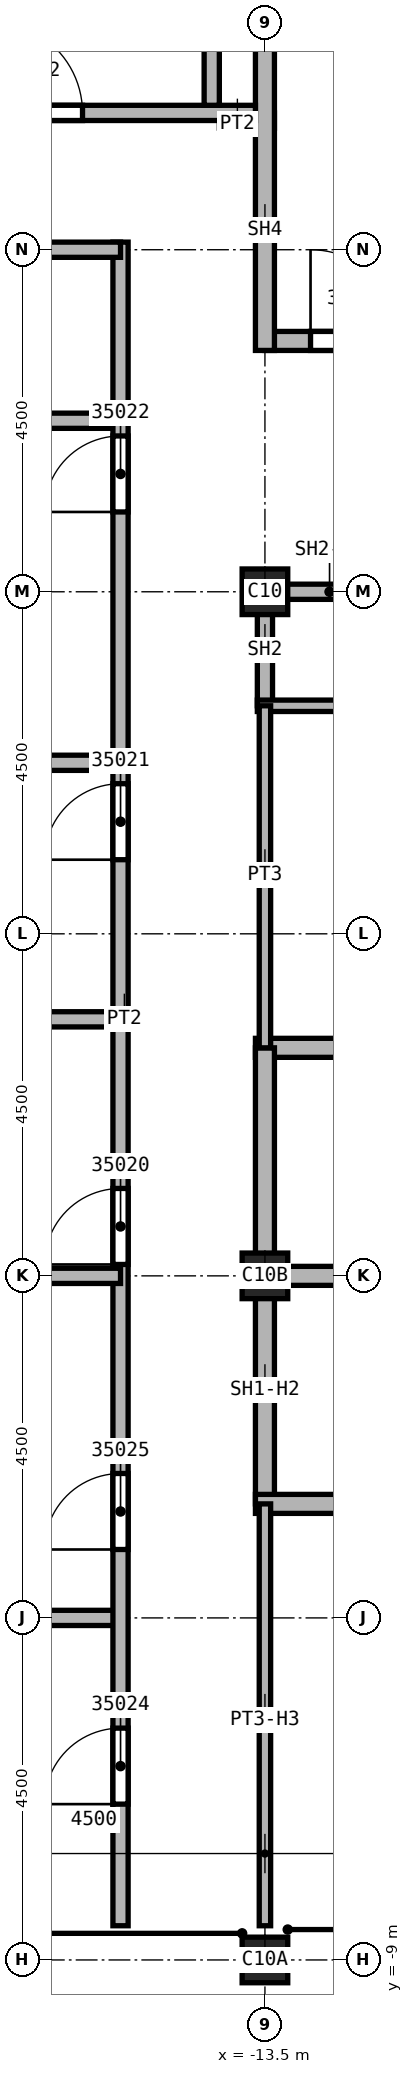
"""IFC4 building model, lengths in metres.
Left out: names, types, materials, properties, quantities, classifications, styles, units other than length and angle.
Written with IfcOpenShell. Run it as: python <this file> out.ifc"""

import sys

from ifc_helpers import new_model, si_unit, direction, frame, frame_2d, origin, origin_2d, place, context, subcontext, project, spatial, rectangle, extrude, element, fill, save


model = new_model("IFC4")
c1 = context("Model", 3, precision=1e-05, world=origin(), true_north=direction((0.0, 1.0)))
c2 = subcontext(c1, "Body", "Model", "MODEL_VIEW")
j1 = project(units=[si_unit("LENGTHUNIT", "METRE"), si_unit("PLANEANGLEUNIT", "RADIAN")], contexts=[c1])
p1 = place(None, origin())
s1 = spatial("IfcSite", under=j1, at=p1, CompositionType="ELEMENT")
p2 = place(p1, origin())
s2 = spatial("IfcBuilding", under=s1, at=p2, CompositionType="ELEMENT")
p3 = place(p2, frame((0.0, 0.0, 376.0)))
s3 = spatial("IfcBuildingStorey", under=s2, at=p3, CompositionType="ELEMENT", Elevation=376.0)
p4 = place(p3, frame((-13.5, 0.0, 0.0), z_axis=(0.0, 0.0, 1.0), x_axis=(1.0, 0.0, 0.0)))
e1 = element("IfcColumn", 1, at=p4, inside=s3, PredefinedType="COLUMN", context=c2, shape_type="SweptSolid", body=[
    extrude(rectangle(XDim=0.6, YDim=0.6, at=origin_2d()), origin(), (0.0, 0.0, 1.0), 7.919),
])
p5 = place(p3, frame((-13.5, 9.0, 0.0), z_axis=(0.0, 0.0, 1.0), x_axis=(1.0, 0.0, 0.0)))
e2 = element("IfcColumn", 2, at=p5, inside=s3, PredefinedType="COLUMN", context=c2, shape_type="SweptSolid", body=[
    extrude(rectangle(XDim=0.6, YDim=0.6, at=origin_2d()), origin(), (0.0, 0.0, 1.0), 4.6),
])
p6 = place(p3, frame((-13.5, -9.0, 0.0), z_axis=(0.0, 0.0, 1.0), x_axis=(1.0, 0.0, 0.0)))
e3 = element("IfcColumn", 3, at=p6, inside=s3, PredefinedType="COLUMN", context=c2, shape_type="SweptSolid", body=[
    extrude(rectangle(XDim=0.6, YDim=0.6, at=origin_2d()), origin(), (0.0, 0.0, 1.0), 3.725),
])
for number, where, z_axis, x_axis in (
    (4, (-26.736, 3.375, 0.0), (0.0, 0.0, 1.0), (1.0, 0.0, 0.0)),
    (5, (-26.736, 11.25, 0.0), (0.0, 0.0, 1.0), (1.0, 0.0, 0.0)),
):
    element("IfcWall", number, at=place(p3, frame(where, z_axis=z_axis, x_axis=x_axis)), inside=s3, PredefinedType="PARTITIONING", context=c2, shape_type="SweptSolid", body=[
        extrude(rectangle(XDim=11.336, YDim=0.2, at=frame_2d((5.668, 0.0))), origin(), (0.0, 0.0, 1.0), 4.15),
    ])
p7 = place(p3, frame((-26.55, -4.5, 0.0), z_axis=(0.0, 0.0, 1.0), x_axis=(1.0, 0.0, 0.0)))
e6 = element("IfcWall", 6, at=p7, inside=s3, PredefinedType="PARTITIONING", context=c2, shape_type="SweptSolid", body=[
    extrude(rectangle(XDim=11.15, YDim=0.2, at=frame_2d((5.575, 0.0))), origin(), (0.0, 0.0, 1.0), 4.566),
])
p8 = place(p3, frame((-20.65, 6.75, 0.0), z_axis=(0.0, 0.0, 1.0), x_axis=(1.0, 0.0, 0.0)))
e7 = element("IfcWall", 7, at=p8, inside=s3, PredefinedType="PARTITIONING", context=c2, shape_type="SweptSolid", body=[
    extrude(rectangle(XDim=5.25, YDim=0.2, at=frame_2d((2.625, 0.0))), origin(), (0.0, 0.0, 1.0), 4.15),
])
p9 = place(p3, frame((-15.4, -8.55, 0.0), z_axis=(0.0, 0.0, 1.0), x_axis=(0.0, 1.0, 0.0)))
e8 = element("IfcWall", 8, at=p9, inside=s3, PredefinedType="PARTITIONING", context=c2, shape_type="SweptSolid", body=[
    extrude(rectangle(XDim=22.15, YDim=0.2, at=frame_2d((11.075, 0.0))), origin(), (0.0, 0.0, 1.0), 4.15),
])
p10 = place(p9, frame((8.7, 0.0, 0.0)))
e9 = element("IfcOpeningElement", 9, at=p10, cuts=e8, PredefinedType="OPENING", context=c2, shape_type="SweptSolid", body=[
    extrude(rectangle(XDim=1.0, YDim=2.1, at=frame_2d((0.5, 1.05))), frame((0.0, 0.1, 0.0), z_axis=(0.0, -1.0, 0.0), x_axis=(1.0, 0.0, 0.0)), (0.0, 0.0, 1.0), 0.2),
])
p11 = place(p9, frame((14.025, 0.0, 0.0)))
e10 = element("IfcOpeningElement", 10, at=p11, cuts=e8, PredefinedType="OPENING", context=c2, shape_type="SweptSolid", body=[
    extrude(rectangle(XDim=1.0, YDim=2.1, at=frame_2d((0.5, 1.05))), frame((0.0, 0.1, 0.0), z_axis=(0.0, -1.0, 0.0), x_axis=(1.0, 0.0, 0.0)), (0.0, 0.0, 1.0), 0.2),
])
p12 = place(p9, frame((18.6, 0.0, 0.0)))
e11 = element("IfcOpeningElement", 11, at=p12, cuts=e8, PredefinedType="OPENING", context=c2, shape_type="SweptSolid", body=[
    extrude(rectangle(XDim=1.0, YDim=2.1, at=frame_2d((0.5, 1.05))), frame((0.0, 0.1, 0.0), z_axis=(0.0, -1.0, 0.0), x_axis=(1.0, 0.0, 0.0)), (0.0, 0.0, 1.0), 0.2),
])
p13 = place(p9, frame((1.6, 0.0, 0.0)))
e12 = element("IfcOpeningElement", 12, at=p13, cuts=e8, PredefinedType="OPENING", context=c2, shape_type="SweptSolid", body=[
    extrude(rectangle(XDim=1.0, YDim=2.1, at=frame_2d((0.5, 1.05))), frame((0.0, 0.1, 0.0), z_axis=(0.0, -1.0, 0.0), x_axis=(1.0, 0.0, 0.0)), (0.0, 0.0, 1.0), 0.2),
])
p14 = place(p9, frame((4.95, 0.0, 0.0)))
e13 = element("IfcOpeningElement", 13, at=p14, cuts=e8, PredefinedType="OPENING", context=c2, shape_type="SweptSolid", body=[
    extrude(rectangle(XDim=1.0, YDim=2.1, at=frame_2d((0.5, 1.05))), frame((0.0, 0.1, 0.0), z_axis=(0.0, -1.0, 0.0), x_axis=(1.0, 0.0, 0.0)), (0.0, 0.0, 1.0), 0.2),
])
p15 = place(p3, frame((-15.4, 0.0, 0.0), z_axis=(0.0, 0.0, 1.0), x_axis=(-1.0, 0.0, 0.0)))
e14 = element("IfcWall", 14, at=p15, inside=s3, PredefinedType="PARTITIONING", context=c2, shape_type="SweptSolid", body=[
    extrude(rectangle(XDim=11.15, YDim=0.2, at=frame_2d((5.575, 0.0))), origin(), (0.0, 0.0, 1.0), 6.453),
])
p16 = place(p3, frame((-15.4, 13.5, 0.0), z_axis=(0.0, 0.0, 1.0), x_axis=(-1.0, 0.0, 0.0)))
e15 = element("IfcWall", 15, at=p16, inside=s3, PredefinedType="PARTITIONING", context=c2, shape_type="SweptSolid", body=[
    extrude(rectangle(XDim=6.6, YDim=0.2, at=frame_2d((3.3, 0.0))), origin(), (0.0, 0.0, 1.0), 4.15),
])
p17 = place(p16, frame((3.7, 0.0, 0.0)))
e16 = element("IfcOpeningElement", 16, at=p17, cuts=e15, PredefinedType="OPENING", context=c2, shape_type="SweptSolid", body=[
    extrude(rectangle(XDim=1.0, YDim=2.1, at=frame_2d((0.5, 1.05))), frame((0.0, 0.1, 0.0), z_axis=(0.0, -1.0, 0.0), x_axis=(1.0, 0.0, 0.0)), (0.0, 0.0, 1.0), 0.2),
])
p18 = place(p3, frame((-14.1, 15.2, 0.0), z_axis=(0.0, 0.0, 1.0), x_axis=(1.0, 0.0, 0.0)))
e17 = element("IfcWall", 17, at=p18, inside=s3, PredefinedType="PARTITIONING", context=c2, shape_type="SweptSolid", body=[
    extrude(rectangle(XDim=0.725, YDim=0.2, at=frame_2d((0.363, 0.0))), origin(), (0.0, 0.0, 1.0), 4.15),
])
p19 = place(p3, frame((-13.5, 7.5, 0.0), z_axis=(0.0, 0.0, 1.0), x_axis=(0.0, 1.0, 0.0)))
e18 = element("IfcWall", 18, at=p19, inside=s3, PredefinedType="SOLIDWALL", context=c2, shape_type="SweptSolid", body=[
    extrude(rectangle(XDim=1.6, YDim=0.2, at=frame_2d((0.8, 0.0))), origin(), (0.0, 0.0, 1.0), 4.15),
])
p20 = place(p3, frame((-13.5, 9.0, 0.0), z_axis=(0.0, 0.0, 1.0), x_axis=(1.0, 0.0, 0.0)))
e19 = element("IfcWall", 19, at=p20, inside=s3, PredefinedType="SOLIDWALL", context=c2, shape_type="SweptSolid", body=[
    extrude(rectangle(XDim=3.0, YDim=0.2, at=frame_2d((1.5, 0.0))), origin(), (0.0, 0.0, 1.0), 3.754),
])
p21 = place(p20, frame((1.6, 0.0, 0.0)))
e20 = element("IfcOpeningElement", 20, at=p21, cuts=e19, PredefinedType="OPENING", context=c2, shape_type="SweptSolid", body=[
    extrude(rectangle(XDim=1.1, YDim=2.1, at=frame_2d((0.55, 1.05))), frame((0.0, 0.1, 0.0), z_axis=(0.0, -1.0, 0.0), x_axis=(1.0, 0.0, 0.0)), (0.0, 0.0, 1.0), 0.2),
])
p22 = place(p3, frame((-13.625, 0.0, 0.0), z_axis=(0.0, 0.0, 1.0), x_axis=(1.0, 0.0, 0.0)))
e21 = element("IfcWall", 21, at=p22, inside=s3, PredefinedType="SOLIDWALL", context=c2, shape_type="SweptSolid", body=[
    extrude(rectangle(XDim=3.125, YDim=0.25, at=frame_2d((1.562, 0.0))), origin(), (0.0, 0.0, 1.0), 7.152),
])
p23 = place(p3, frame((-13.625, 3.0, 0.0), z_axis=(0.0, 0.0, 1.0), x_axis=(1.0, 0.0, 0.0)))
e22 = element("IfcWall", 22, at=p23, inside=s3, PredefinedType="SOLIDWALL", context=c2, shape_type="SweptSolid", body=[
    extrude(rectangle(XDim=6.125, YDim=0.25, at=frame_2d((3.062, 0.0))), origin(), (0.0, 0.0, 1.0), 4.15),
])
p24 = place(p23, frame((4.75, 0.0, 0.0)))
e23 = element("IfcOpeningElement", 23, at=p24, cuts=e22, PredefinedType="OPENING", context=c2, shape_type="SweptSolid", body=[
    extrude(rectangle(XDim=1.1, YDim=2.1, at=frame_2d((0.55, 1.05))), frame((0.0, 0.125, 0.0), z_axis=(0.0, -1.0, 0.0), x_axis=(1.0, 0.0, 0.0)), (0.0, 0.0, 1.0), 0.25),
])
p25 = place(p3, frame((-13.5, -3.0, 0.0), z_axis=(0.0, 0.0, 1.0), x_axis=(0.0, 1.0, 0.0)))
e24 = element("IfcWall", 24, at=p25, inside=s3, PredefinedType="SOLIDWALL", context=c2, shape_type="SweptSolid", body=[
    extrude(rectangle(XDim=6.0, YDim=0.25, at=frame_2d((3.0, 0.0))), origin(), (0.0, 0.0, 1.0), 3.722),
])
p26 = place(p3, frame((-13.625, -3.0, 0.0), z_axis=(0.0, 0.0, 1.0), x_axis=(1.0, 0.0, 0.0)))
e25 = element("IfcWall", 25, at=p26, inside=s3, PredefinedType="SOLIDWALL", context=c2, shape_type="SweptSolid", body=[
    extrude(rectangle(XDim=6.125, YDim=0.25, at=frame_2d((3.062, 0.0))), origin(), (0.0, 0.0, 1.0), 4.566),
])
p27 = place(p26, frame((4.75, 0.0, 0.0)))
e26 = element("IfcOpeningElement", 26, at=p27, cuts=e25, PredefinedType="OPENING", context=c2, shape_type="SweptSolid", body=[
    extrude(rectangle(XDim=1.1, YDim=2.1, at=frame_2d((0.55, 1.05))), frame((0.0, 0.125, 0.0), z_axis=(0.0, -1.0, 0.0), x_axis=(1.0, 0.0, 0.0)), (0.0, 0.0, 1.0), 0.25),
])
p28 = place(p3, frame((-13.5, 12.3, 0.0), z_axis=(0.0, 0.0, 1.0), x_axis=(1.0, 0.0, 0.0)))
e27 = element("IfcWall", 27, at=p28, inside=s3, PredefinedType="SOLIDWALL", context=c2, shape_type="SweptSolid", body=[
    extrude(rectangle(XDim=9.125, YDim=0.25, at=frame_2d((4.562, 0.0))), origin(), (0.0, 0.0, 1.0), 4.15),
])
p29 = place(p28, frame((0.6, 0.0, 0.0)))
e28 = element("IfcOpeningElement", 28, at=p29, cuts=e27, PredefinedType="OPENING", context=c2, shape_type="SweptSolid", body=[
    extrude(rectangle(XDim=1.2, YDim=2.1, at=frame_2d((0.6, 1.05))), frame((0.0, 0.125, 0.0), z_axis=(0.0, -1.0, 0.0), x_axis=(1.0, 0.0, 0.0)), (0.0, 0.0, 1.0), 0.25),
])
p30 = place(p3, frame((-13.5, 12.175, 0.0), z_axis=(0.0, 0.0, 1.0), x_axis=(0.0, 1.0, 0.0)))
e29 = element("IfcWall", 29, at=p30, inside=s3, PredefinedType="SOLIDWALL", context=c2, shape_type="SweptSolid", body=[
    extrude(rectangle(XDim=4.75, YDim=0.25, at=frame_2d((2.375, 0.0))), origin(), (0.0, 0.0, 1.0), 4.15),
])
p31 = place(p3, frame((-13.6, 7.5, 0.0), z_axis=(0.0, 0.0, 1.0), x_axis=(1.0, 0.0, 0.0)))
e30 = element("IfcWall", 30, at=p31, inside=s3, PredefinedType="PARTITIONING", context=c2, shape_type="SweptSolid", body=[
    extrude(rectangle(XDim=3.1, YDim=0.15, at=frame_2d((1.55, 0.0))), origin(), (0.0, 0.0, 1.0), 4.15),
])
p32 = place(p3, frame((-13.5, -8.55, 0.0), z_axis=(0.0, 0.0, 1.0), x_axis=(0.0, 1.0, 0.0)))
e31 = element("IfcWall", 31, at=p32, inside=s3, PredefinedType="PARTITIONING", context=c2, shape_type="SweptSolid", body=[
    extrude(rectangle(XDim=5.55, YDim=0.15, at=frame_2d((2.775, 0.0))), origin(), (0.0, 0.0, 1.0), 3.722),
])
p33 = place(p3, frame((-13.5, 3.0, 0.0), z_axis=(0.0, 0.0, 1.0), x_axis=(0.0, 1.0, 0.0)))
e32 = element("IfcWall", 32, at=p33, inside=s3, PredefinedType="PARTITIONING", context=c2, shape_type="SweptSolid", body=[
    extrude(rectangle(XDim=4.5, YDim=0.15, at=frame_2d((2.25, 0.0))), origin(), (0.0, 0.0, 1.0), 4.15),
])
p34 = place(p3, frame((-21.9, 15.3, 0.0), z_axis=(0.0, 0.0, 1.0), x_axis=(1.0, 0.0, 0.0)))
e33 = element("IfcWall", 33, at=p34, inside=s3, PredefinedType="SOLIDWALL", context=c2, shape_type="SweptSolid", body=[
    extrude(rectangle(XDim=8.275, YDim=0.2, at=frame_2d((4.137, 0.0))), origin(), (0.0, 0.0, 1.0), 4.15),
])
p35 = place(p34, frame((4.8, 0.0, 0.0)))
e34 = element("IfcOpeningElement", 34, at=p35, cuts=e33, PredefinedType="OPENING", context=c2, shape_type="SweptSolid", body=[
    extrude(rectangle(XDim=1.2, YDim=2.1, at=frame_2d((0.6, 1.05))), frame((0.0, 0.1, 0.0), z_axis=(0.0, -1.0, 0.0), x_axis=(1.0, 0.0, 0.0)), (0.0, 0.0, 1.0), 0.2),
])
p36 = place(p3, frame((-14.2, 15.4, 0.0), z_axis=(0.0, 0.0, 1.0), x_axis=(0.0, 1.0, 0.0)))
e35 = element("IfcWall", 35, at=p36, inside=s3, PredefinedType="SOLIDWALL", context=c2, shape_type="SweptSolid", body=[
    extrude(rectangle(XDim=5.9, YDim=0.2, at=frame_2d((2.95, 0.0))), origin(), (0.0, 0.0, 1.0), 4.15),
])
p37 = place(p29, origin())
e36 = element("IfcDoor", 36, at=p37, inside=s3, OperationType="SINGLE_SWING_RIGHT", PredefinedType="DOOR", context=c2, shape_type="SweptSolid", body=[
    extrude(rectangle(XDim=1.2, YDim=2.1, at=frame_2d((0.6, 1.05))), frame((0.0, 0.025, 0.0), z_axis=(0.0, -1.0, 0.0), x_axis=(1.0, 0.0, 0.0)), (0.0, 0.0, 1.0), 0.05),
])
fill(e28, e36)
p38 = place(p10, origin())
e37 = element("IfcDoor", 37, at=p38, inside=s3, OperationType="SINGLE_SWING_LEFT", PredefinedType="DOOR", context=c2, shape_type="SweptSolid", body=[
    extrude(rectangle(XDim=1.0, YDim=2.1, at=frame_2d((0.5, 1.05))), frame((0.0, 0.025, 0.0), z_axis=(0.0, -1.0, 0.0), x_axis=(1.0, 0.0, 0.0)), (0.0, 0.0, 1.0), 0.05),
])
fill(e9, e37)
p39 = place(p11, origin())
e38 = element("IfcDoor", 38, at=p39, inside=s3, OperationType="SINGLE_SWING_RIGHT", PredefinedType="DOOR", context=c2, shape_type="SweptSolid", body=[
    extrude(rectangle(XDim=1.0, YDim=2.1, at=frame_2d((0.5, 1.05))), frame((0.0, 0.025, 0.0), z_axis=(0.0, -1.0, 0.0), x_axis=(1.0, 0.0, 0.0)), (0.0, 0.0, 1.0), 0.05),
])
fill(e10, e38)
p40 = place(p12, origin())
e39 = element("IfcDoor", 39, at=p40, inside=s3, OperationType="SINGLE_SWING_LEFT", PredefinedType="DOOR", context=c2, shape_type="SweptSolid", body=[
    extrude(rectangle(XDim=1.0, YDim=2.1, at=frame_2d((0.5, 1.05))), frame((0.0, 0.025, 0.0), z_axis=(0.0, -1.0, 0.0), x_axis=(1.0, 0.0, 0.0)), (0.0, 0.0, 1.0), 0.05),
])
fill(e11, e39)
p41 = place(p13, origin())
e40 = element("IfcDoor", 40, at=p41, inside=s3, OperationType="SINGLE_SWING_LEFT", PredefinedType="DOOR", context=c2, shape_type="SweptSolid", body=[
    extrude(rectangle(XDim=1.0, YDim=2.1, at=frame_2d((0.5, 1.05))), frame((0.0, 0.025, 0.0), z_axis=(0.0, -1.0, 0.0), x_axis=(1.0, 0.0, 0.0)), (0.0, 0.0, 1.0), 0.05),
])
fill(e12, e40)
p42 = place(p14, origin())
e41 = element("IfcDoor", 41, at=p42, inside=s3, OperationType="SINGLE_SWING_RIGHT", PredefinedType="DOOR", context=c2, shape_type="SweptSolid", body=[
    extrude(rectangle(XDim=1.0, YDim=2.1, at=frame_2d((0.5, 1.05))), frame((0.0, 0.025, 0.0), z_axis=(0.0, -1.0, 0.0), x_axis=(1.0, 0.0, 0.0)), (0.0, 0.0, 1.0), 0.05),
])
fill(e13, e41)
p43 = place(p35, origin())
e42 = element("IfcDoor", 42, at=p43, inside=s3, OperationType="SINGLE_SWING_RIGHT", PredefinedType="DOOR", context=c2, shape_type="SweptSolid", body=[
    extrude(rectangle(XDim=1.2, YDim=2.1, at=frame_2d((0.6, 1.05))), frame((0.0, 0.025, 0.0), z_axis=(0.0, -1.0, 0.0), x_axis=(1.0, 0.0, 0.0)), (0.0, 0.0, 1.0), 0.05),
])
fill(e34, e42)
save(model, sys.argv[1])
